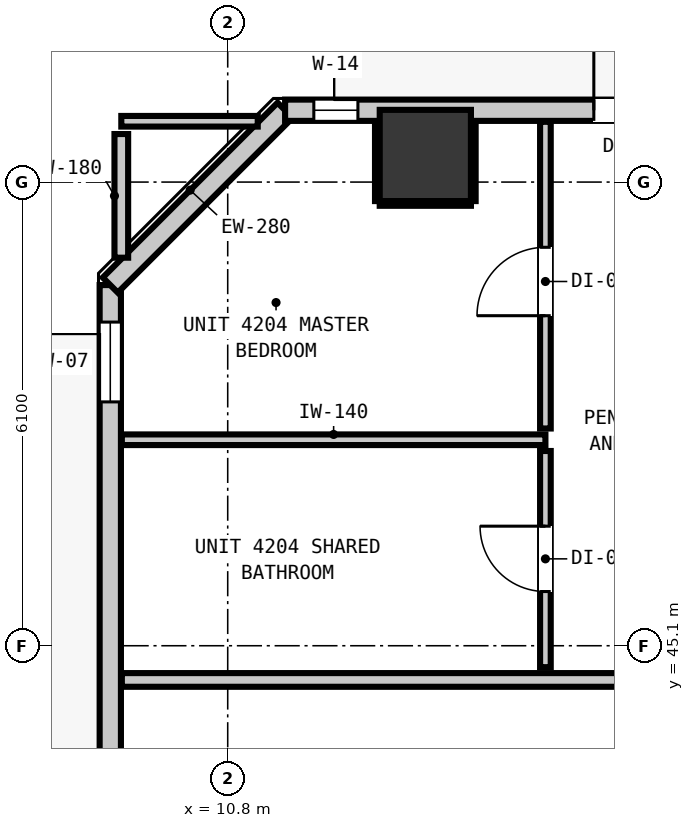
"""IFC4 building model, lengths in metres.
Left out: names, types, materials, properties, quantities, classifications, styles, units other than length and angle.
Written with IfcOpenShell. Run it as: python <this file> out.ifc"""

import sys

from ifc_helpers import new_model, si_unit, direction, frame, frame_2d, origin, origin_2d, place, context, subcontext, project, spatial, rectangle, extrude, element, fill, save


model = new_model("IFC4")
c1 = context("Model", 3, precision=1e-05, world=origin(), true_north=direction((0.0, 1.0)))
c2 = subcontext(c1, "Body", "Model", "MODEL_VIEW")
j1 = project(units=[si_unit("LENGTHUNIT", "METRE"), si_unit("PLANEANGLEUNIT", "RADIAN")], contexts=[c1])
p1 = place(None, origin())
s1 = spatial("IfcSite", under=j1, at=p1, CompositionType="ELEMENT")
p2 = place(p1, origin())
s2 = spatial("IfcBuilding", under=s1, at=p2, CompositionType="ELEMENT")
p3 = place(p2, frame((0.0, 0.0, 145.92)))
s3 = spatial("IfcBuildingStorey", under=s2, at=p3, CompositionType="ELEMENT", Elevation=145.92)
p4 = place(p3, frame((13.4, 51.55, -0.2), z_axis=(0.0, 0.0, 1.0), x_axis=(1.0, 0.0, 0.0)))
e1 = element("IfcColumn", 1, at=p4, inside=s3, PredefinedType="COLUMN", context=c2, shape_type="SweptSolid", body=[
    extrude(rectangle(XDim=1.2, YDim=1.2, at=origin_2d()), origin(), (0.0, 0.0, 1.0), 3.52),
])
p5 = place(p3, frame((9.255, 17.555, 0.0), z_axis=(0.0, 0.0, 1.0), x_axis=(0.0, 1.0, 0.0)))
e2 = element("IfcWall", 2, at=p5, inside=s3, PredefinedType="STANDARD", context=c2, shape_type="SweptSolid", body=[
    extrude(rectangle(XDim=32.29, YDim=0.28, at=frame_2d((16.145, 0.0))), origin(), (0.0, 0.0, 1.0), 3.08),
])
p6 = place(p5, frame((5.467, 0.0, 0.0)))
e3 = element("IfcOpeningElement", 3, at=p6, cuts=e2, PredefinedType="OPENING", context=c2, shape_type="SweptSolid", body=[
    extrude(rectangle(XDim=1.0, YDim=2.15, at=frame_2d((0.5, 1.075))), frame((0.0, 0.15, 0.0), z_axis=(0.0, -1.0, 0.0), x_axis=(1.0, 0.0, 0.0)), (0.0, 0.0, 1.0), 0.3),
])
p7 = place(p5, frame((30.753, 0.0, 0.85)))
e4 = element("IfcOpeningElement", 4, at=p7, cuts=e2, PredefinedType="OPENING", context=c2, shape_type="SweptSolid", body=[
    extrude(rectangle(XDim=1.05, YDim=1.65, at=frame_2d((0.525, 0.825))), frame((0.0, 0.15, 0.0), z_axis=(0.0, -1.0, 0.0), x_axis=(1.0, 0.0, 0.0)), (0.0, 0.0, 1.0), 0.3),
])
p8 = place(p3, frame((9.255, 49.845, 0.0), z_axis=(0.0, 0.0, 1.0), x_axis=(0.707106781187, 0.707106781187, 0.0)))
e5 = element("IfcWall", 5, at=p8, inside=s3, PredefinedType="STANDARD", context=c2, shape_type="SweptSolid", body=[
    extrude(rectangle(XDim=3.253, YDim=0.28, at=frame_2d((1.626, 0.0))), origin(), (0.0, 0.0, 1.0), 3.08),
])
p9 = place(p3, frame((11.555, 52.145, 0.0), z_axis=(0.0, 0.0, 1.0), x_axis=(1.0, 0.0, 0.0)))
e6 = element("IfcWall", 6, at=p9, inside=s3, PredefinedType="STANDARD", context=c2, shape_type="SweptSolid", body=[
    extrude(rectangle(XDim=35.09, YDim=0.28, at=frame_2d((17.545, 0.0))), origin(), (0.0, 0.0, 1.0), 3.08),
])
p10 = place(p9, frame((4.062, 0.0, 0.0)))
e7 = element("IfcOpeningElement", 7, at=p10, cuts=e6, PredefinedType="OPENING", context=c2, shape_type="SweptSolid", body=[
    extrude(rectangle(XDim=1.0, YDim=2.15, at=frame_2d((0.5, 1.075))), frame((0.0, 0.15, 0.0), z_axis=(0.0, -1.0, 0.0), x_axis=(1.0, 0.0, 0.0)), (0.0, 0.0, 1.0), 0.3),
])
p11 = place(p9, frame((5.588, 0.0, 0.85)))
e8 = element("IfcOpeningElement", 8, at=p11, cuts=e6, PredefinedType="OPENING", context=c2, shape_type="SweptSolid", body=[
    extrude(rectangle(XDim=1.65, YDim=1.75, at=frame_2d((0.825, 0.875))), frame((0.0, 0.15, 0.0), z_axis=(0.0, -1.0, 0.0), x_axis=(1.0, 0.0, 0.0)), (0.0, 0.0, 1.0), 0.3),
])
p12 = place(p9, frame((0.378, 0.0, 0.85)))
e9 = element("IfcOpeningElement", 9, at=p12, cuts=e6, PredefinedType="OPENING", context=c2, shape_type="SweptSolid", body=[
    extrude(rectangle(XDim=0.58, YDim=1.5, at=frame_2d((0.29, 0.75))), frame((0.0, 0.15, 0.0), z_axis=(0.0, -1.0, 0.0), x_axis=(1.0, 0.0, 0.0)), (0.0, 0.0, 1.0), 0.3),
])
p13 = place(p9, frame((10.133, 0.0, 0.85)))
e10 = element("IfcOpeningElement", 10, at=p13, cuts=e6, PredefinedType="OPENING", context=c2, shape_type="SweptSolid", body=[
    extrude(rectangle(XDim=1.65, YDim=1.75, at=frame_2d((0.825, 0.875))), frame((0.0, 0.15, 0.0), z_axis=(0.0, -1.0, 0.0), x_axis=(1.0, 0.0, 0.0)), (0.0, 0.0, 1.0), 0.3),
])
p14 = place(p9, frame((13.833, 0.0, 0.85)))
e11 = element("IfcOpeningElement", 11, at=p14, cuts=e6, PredefinedType="OPENING", context=c2, shape_type="SweptSolid", body=[
    extrude(rectangle(XDim=1.65, YDim=1.75, at=frame_2d((0.825, 0.875))), frame((0.0, 0.15, 0.0), z_axis=(0.0, -1.0, 0.0), x_axis=(1.0, 0.0, 0.0)), (0.0, 0.0, 1.0), 0.3),
])
p15 = place(p9, frame((29.448, 0.0, 0.85)))
e12 = element("IfcOpeningElement", 12, at=p15, cuts=e6, PredefinedType="OPENING", context=c2, shape_type="SweptSolid", body=[
    extrude(rectangle(XDim=1.65, YDim=1.75, at=frame_2d((0.825, 0.875))), frame((0.0, 0.15, 0.0), z_axis=(0.0, -1.0, 0.0), x_axis=(1.0, 0.0, 0.0)), (0.0, 0.0, 1.0), 0.3),
])
p16 = place(p3, frame((9.407, 44.65, 0.0), z_axis=(0.0, 0.0, 1.0), x_axis=(1.0, 0.0, 0.0)))
e13 = element("IfcWall", 13, at=p16, inside=s3, PredefinedType="PARTITIONING", context=c2, shape_type="SweptSolid", body=[
    extrude(rectangle(XDim=39.386, YDim=0.18, at=frame_2d((19.693, 0.0))), origin(), (0.0, 0.0, 1.0), 3.08),
])
p17 = place(p16, frame((7.193, 0.0, 0.0)))
e14 = element("IfcOpeningElement", 14, at=p17, cuts=e13, PredefinedType="OPENING", context=c2, shape_type="SweptSolid", body=[
    extrude(rectangle(XDim=1.0, YDim=2.15, at=frame_2d((0.5, 1.075))), frame((0.0, 0.1, 0.0), z_axis=(0.0, -1.0, 0.0), x_axis=(1.0, 0.0, 0.0)), (0.0, 0.0, 1.0), 0.2),
])
p18 = place(p16, frame((17.866, 0.0, 0.0)))
e15 = element("IfcOpeningElement", 15, at=p18, cuts=e13, PredefinedType="OPENING", context=c2, shape_type="SweptSolid", body=[
    extrude(rectangle(XDim=1.0, YDim=2.15, at=frame_2d((0.5, 1.075))), frame((0.0, 0.1, 0.0), z_axis=(0.0, -1.0, 0.0), x_axis=(1.0, 0.0, 0.0)), (0.0, 0.0, 1.0), 0.2),
])
p19 = place(p16, frame((31.929, 0.0, 0.0)))
e16 = element("IfcOpeningElement", 16, at=p19, cuts=e13, PredefinedType="OPENING", context=c2, shape_type="SweptSolid", body=[
    extrude(rectangle(XDim=0.9, YDim=2.1, at=frame_2d((0.45, 1.05))), frame((0.0, 0.1, 0.0), z_axis=(0.0, -1.0, 0.0), x_axis=(1.0, 0.0, 0.0)), (0.0, 0.0, 1.0), 0.2),
])
p20 = place(p3, frame((9.407, 47.81, 0.0), z_axis=(0.0, 0.0, 1.0), x_axis=(1.0, 0.0, 0.0)))
e17 = element("IfcWall", 17, at=p20, inside=s3, PredefinedType="PARTITIONING", context=c2, shape_type="SweptSolid", body=[
    extrude(rectangle(XDim=5.573, YDim=0.14, at=frame_2d((2.787, 0.0))), origin(), (0.0, 0.0, 1.0), 3.08),
])
p21 = place(p3, frame((9.4, 52.0, 0.0), z_axis=(0.0, 0.0, 1.0), x_axis=(1.0, 0.0, 0.0)))
e18 = element("IfcWall", 18, at=p21, inside=s3, PredefinedType="PARTITIONING", context=c2, shape_type="SweptSolid", body=[
    extrude(rectangle(XDim=1.795, YDim=0.14, at=frame_2d((0.897, 0.0))), origin(), (0.0, 0.0, 1.0), 3.08),
])
p22 = place(p3, frame((9.4, 50.205, 0.0), z_axis=(0.0, 0.0, 1.0), x_axis=(0.0, 1.0, 0.0)))
e19 = element("IfcWall", 19, at=p22, inside=s3, PredefinedType="PARTITIONING", context=c2, shape_type="SweptSolid", body=[
    extrude(rectangle(XDim=1.627, YDim=0.18, at=frame_2d((0.813, 0.0))), origin(), (0.0, 0.0, 1.0), 3.08),
])
p23 = place(p3, frame((14.98, 44.818, 0.0), z_axis=(0.0, 0.0, 1.0), x_axis=(0.0, 1.0, 0.0)))
e20 = element("IfcWall", 20, at=p23, inside=s3, PredefinedType="PARTITIONING", context=c2, shape_type="SweptSolid", body=[
    extrude(rectangle(XDim=2.844, YDim=0.14, at=frame_2d((1.422, 0.0))), origin(), (0.0, 0.0, 1.0), 3.08),
])
p24 = place(p23, frame((0.995, 0.0, 0.0)))
e21 = element("IfcOpeningElement", 21, at=p24, cuts=e20, PredefinedType="OPENING", context=c2, shape_type="SweptSolid", body=[
    extrude(rectangle(XDim=0.86, YDim=2.02, at=frame_2d((0.43, 1.01))), frame((0.0, 0.08, 0.0), z_axis=(0.0, -1.0, 0.0), x_axis=(1.0, 0.0, 0.0)), (0.0, 0.0, 1.0), 0.16),
])
p25 = place(p3, frame((14.98, 47.958, 0.0), z_axis=(0.0, 0.0, 1.0), x_axis=(0.0, 1.0, 0.0)))
e22 = element("IfcWall", 22, at=p25, inside=s3, PredefinedType="PARTITIONING", context=c2, shape_type="SweptSolid", body=[
    extrude(rectangle(XDim=4.035, YDim=0.14, at=frame_2d((2.018, 0.0))), origin(), (0.0, 0.0, 1.0), 3.08),
])
p26 = place(p25, frame((1.484, 0.0, 0.0)))
e23 = element("IfcOpeningElement", 23, at=p26, cuts=e22, PredefinedType="OPENING", context=c2, shape_type="SweptSolid", body=[
    extrude(rectangle(XDim=0.9, YDim=2.1, at=frame_2d((0.45, 1.05))), frame((0.0, 0.08, 0.0), z_axis=(0.0, -1.0, 0.0), x_axis=(1.0, 0.0, 0.0)), (0.0, 0.0, 1.0), 0.16),
])
p27 = place(p3, frame((12.8, 50.918, 0.0), z_axis=(0.0, 0.0, 1.0), x_axis=(1.0, 0.0, 0.0)))
e24 = element("IfcWall", 24, at=p27, inside=s3, PredefinedType="PARTITIONING", context=c2, shape_type="SweptSolid", body=[
    extrude(rectangle(XDim=1.2, YDim=0.06, at=frame_2d((0.6, 0.0))), origin(), (0.0, 0.0, 1.0), 1.45),
])
for number, where, z_axis, x_axis in (
    (25, (12.768, 50.95, 0.0), (0.0, 0.0, 1.0), (0.0, 1.0, 0.0)),
    (26, (14.032, 50.95, 0.0), (0.0, 0.0, 1.0), (0.0, 1.0, 0.0)),
):
    element("IfcWall", number, at=place(p3, frame(where, z_axis=z_axis, x_axis=x_axis)), inside=s3, PredefinedType="PARTITIONING", context=c2, shape_type="SweptSolid", body=[
        extrude(rectangle(XDim=1.04, YDim=0.06, at=frame_2d((0.52, 0.0))), origin(), (0.0, 0.0, 1.0), 1.45),
    ])
p28 = place(p10, origin())
e27 = element("IfcDoor", 27, at=p28, inside=s3, OperationType="SINGLE_SWING_LEFT", PredefinedType="DOOR", context=c2, shape_type="SweptSolid", body=[
    extrude(rectangle(XDim=1.0, YDim=2.15, at=frame_2d((0.5, 1.075))), frame((0.0, 0.025, 0.0), z_axis=(0.0, -1.0, 0.0), x_axis=(1.0, 0.0, 0.0)), (0.0, 0.0, 1.0), 0.05),
])
fill(e7, e27)
p29 = place(p7, origin())
e28 = element("IfcWindow", 28, at=p29, inside=s3, PartitioningType="SINGLE_PANEL", PredefinedType="WINDOW", context=c2, shape_type="SweptSolid", body=[
    extrude(rectangle(XDim=1.05, YDim=1.65, at=frame_2d((0.525, 0.825))), frame((0.0, 0.03, 0.0), z_axis=(0.0, -1.0, 0.0), x_axis=(1.0, 0.0, 0.0)), (0.0, 0.0, 1.0), 0.06),
])
fill(e4, e28)
p30 = place(p12, origin())
e29 = element("IfcWindow", 29, at=p30, inside=s3, PartitioningType="SINGLE_PANEL", PredefinedType="WINDOW", context=c2, shape_type="SweptSolid", body=[
    extrude(rectangle(XDim=0.58, YDim=1.5, at=frame_2d((0.29, 0.75))), frame((0.0, 0.03, 0.0), z_axis=(0.0, -1.0, 0.0), x_axis=(1.0, 0.0, 0.0)), (0.0, 0.0, 1.0), 0.06),
])
fill(e9, e29)
p31 = place(p24, origin())
e30 = element("IfcDoor", 30, at=p31, inside=s3, OperationType="SINGLE_SWING_RIGHT", PredefinedType="DOOR", context=c2, shape_type="SweptSolid", body=[
    extrude(rectangle(XDim=0.86, YDim=2.02, at=frame_2d((0.43, 1.01))), frame((0.0, 0.025, 0.0), z_axis=(0.0, -1.0, 0.0), x_axis=(1.0, 0.0, 0.0)), (0.0, 0.0, 1.0), 0.05),
])
fill(e21, e30)
p32 = place(p26, origin())
e31 = element("IfcDoor", 31, at=p32, inside=s3, OperationType="SINGLE_SWING_LEFT", PredefinedType="DOOR", context=c2, shape_type="SweptSolid", body=[
    extrude(rectangle(XDim=0.9, YDim=2.1, at=frame_2d((0.45, 1.05))), frame((0.0, 0.025, 0.0), z_axis=(0.0, -1.0, 0.0), x_axis=(1.0, 0.0, 0.0)), (0.0, 0.0, 1.0), 0.05),
])
fill(e23, e31)
save(model, sys.argv[1])
